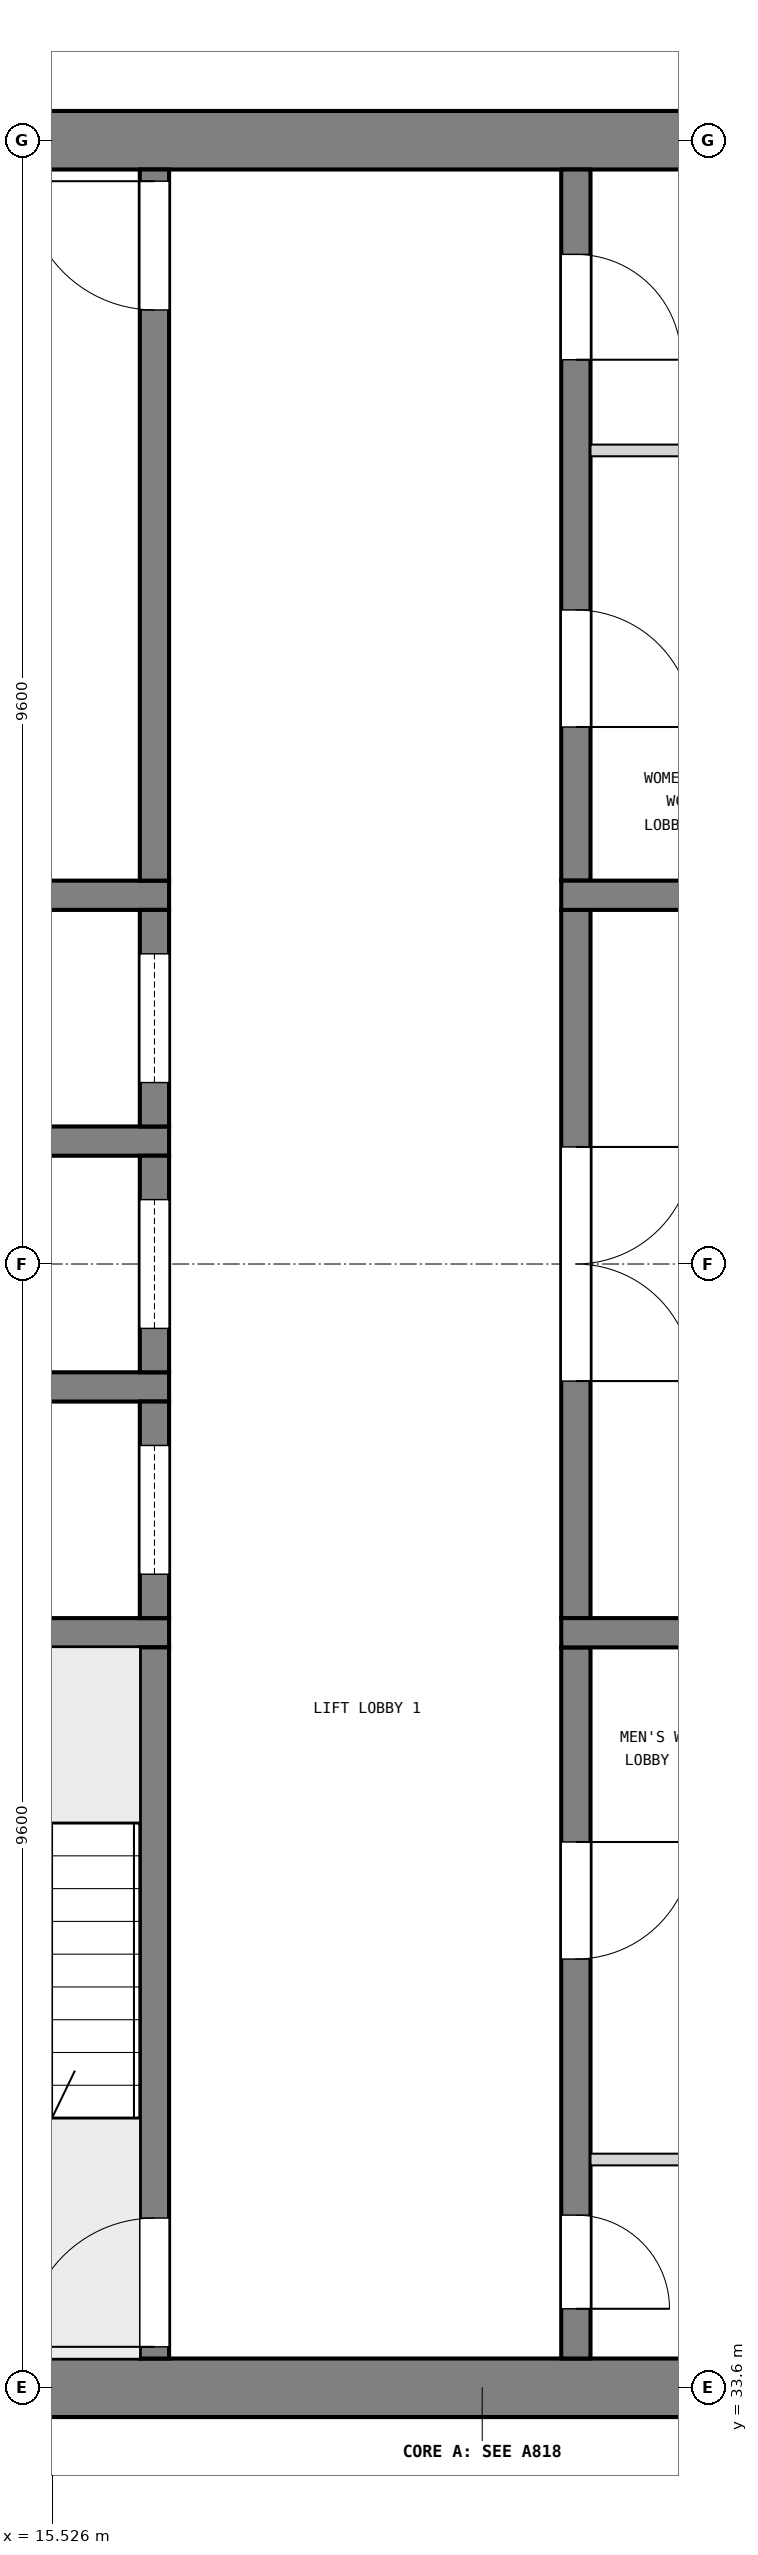
"""IFC4 building model, lengths in metres.
Left out: names, types, materials, properties, quantities, classifications, styles, units other than length and angle.
Written with IfcOpenShell. Run it as: python <this file> out.ifc"""

import sys

from ifc_helpers import new_model, si_unit, direction, frame, frame_2d, origin, place, context, subcontext, project, spatial, rectangle, extrude, element, fill, save


model = new_model("IFC4")
c1 = context("Model", 3, precision=1e-05, world=origin(), true_north=direction((0.0, 1.0)))
c2 = subcontext(c1, "Body", "Model", "MODEL_VIEW")
j1 = project(units=[si_unit("LENGTHUNIT", "METRE"), si_unit("PLANEANGLEUNIT", "RADIAN")], contexts=[c1])
p1 = place(None, origin())
s1 = spatial("IfcSite", under=j1, at=p1, CompositionType="ELEMENT")
p2 = place(p1, origin())
s2 = spatial("IfcBuilding", under=s1, at=p2, CompositionType="ELEMENT")
p3 = place(p2, frame((0.0, 0.0, 64.2)))
s3 = spatial("IfcBuildingStorey", under=s2, at=p3, CompositionType="ELEMENT", Elevation=64.2)
p4 = place(p3, frame((12.55, 52.8, 0.0), z_axis=(0.0, 0.0, 1.0), x_axis=(1.0, 0.0, 0.0)))
e1 = element("IfcWall", 1, at=p4, inside=s3, PredefinedType="SHEAR", context=c2, shape_type="SweptSolid", body=[
    extrude(rectangle(XDim=13.3, YDim=0.5, at=frame_2d((6.65, 0.0))), origin(), (0.0, 0.0, 1.0), 5.1),
])
p5 = place(p4, frame((1.85, 0.0, 1.0)))
e2 = element("IfcOpeningElement", 2, at=p5, cuts=e1, PredefinedType="OPENING", context=c2, shape_type="SweptSolid", body=[
    extrude(rectangle(XDim=0.4, YDim=2.0, at=frame_2d((0.2, 1.0))), frame((0.0, 0.26, 0.0), z_axis=(0.0, -1.0, 0.0), x_axis=(1.0, 0.0, 0.0)), (0.0, 0.0, 1.0), 0.52),
])
p6 = place(p3, frame((12.55, 33.6, 0.0), z_axis=(0.0, 0.0, 1.0), x_axis=(1.0, 0.0, 0.0)))
e3 = element("IfcWall", 3, at=p6, inside=s3, PredefinedType="SHEAR", context=c2, shape_type="SweptSolid", body=[
    extrude(rectangle(XDim=13.3, YDim=0.5, at=frame_2d((6.65, 0.0))), origin(), (0.0, 0.0, 1.0), 5.1),
])
p7 = place(p6, frame((1.85, 0.0, 1.0)))
e4 = element("IfcOpeningElement", 4, at=p7, cuts=e3, PredefinedType="OPENING", context=c2, shape_type="SweptSolid", body=[
    extrude(rectangle(XDim=0.4, YDim=2.0, at=frame_2d((0.2, 1.0))), frame((0.0, 0.26, 0.0), z_axis=(0.0, -1.0, 0.0), x_axis=(1.0, 0.0, 0.0)), (0.0, 0.0, 1.0), 0.52),
])
for number, where, z_axis, x_axis in (
    (5, (13.05, 40.05, 0.0), (0.0, 0.0, 1.0), (1.0, 0.0, 0.0)),
    (6, (13.05, 42.15, 0.0), (0.0, 0.0, 1.0), (1.0, 0.0, 0.0)),
    (7, (13.05, 44.25, 0.0), (0.0, 0.0, 1.0), (1.0, 0.0, 0.0)),
    (8, (13.05, 46.35, 0.0), (0.0, 0.0, 1.0), (1.0, 0.0, 0.0)),
):
    element("IfcWall", number, at=place(p3, frame(where, z_axis=z_axis, x_axis=x_axis)), inside=s3, PredefinedType="SOLIDWALL", context=c2, shape_type="SweptSolid", body=[
        extrude(rectangle(XDim=3.475, YDim=0.25, at=frame_2d((1.737, 0.0))), origin(), (0.0, 0.0, 1.0), 5.1),
    ])
p8 = place(p3, frame((16.4, 33.85, 0.0), z_axis=(0.0, 0.0, 1.0), x_axis=(0.0, 1.0, 0.0)))
e9 = element("IfcWall", 9, at=p8, inside=s3, PredefinedType="SOLIDWALL", context=c2, shape_type="SweptSolid", body=[
    extrude(rectangle(XDim=6.075, YDim=0.25, at=frame_2d((3.038, 0.0))), origin(), (0.0, 0.0, 1.0), 5.1),
])
p9 = place(p8, frame((0.1, 0.0, 0.0)))
e10 = element("IfcOpeningElement", 10, at=p9, cuts=e9, PredefinedType="OPENING", context=c2, shape_type="SweptSolid", body=[
    extrude(rectangle(XDim=1.1, YDim=2.1, at=frame_2d((0.55, 1.05))), frame((0.0, 0.135, 0.0), z_axis=(0.0, -1.0, 0.0), x_axis=(1.0, 0.0, 0.0)), (0.0, 0.0, 1.0), 0.27),
])
p10 = place(p3, frame((16.4, 40.175, 0.0), z_axis=(0.0, 0.0, 1.0), x_axis=(0.0, 1.0, 0.0)))
e11 = element("IfcWall", 11, at=p10, inside=s3, PredefinedType="SOLIDWALL", context=c2, shape_type="SweptSolid", body=[
    extrude(rectangle(XDim=1.85, YDim=0.25, at=frame_2d((0.925, 0.0))), origin(), (0.0, 0.0, 1.0), 5.1),
])
p11 = place(p10, frame((0.375, 0.0, 0.0)))
e12 = element("IfcOpeningElement", 12, at=p11, cuts=e11, PredefinedType="OPENING", context=c2, shape_type="SweptSolid", body=[
    extrude(rectangle(XDim=1.1, YDim=2.1, at=frame_2d((0.55, 1.05))), frame((0.0, 0.135, 0.0), z_axis=(0.0, -1.0, 0.0), x_axis=(1.0, 0.0, 0.0)), (0.0, 0.0, 1.0), 0.27),
])
p12 = place(p3, frame((16.4, 42.275, 0.0), z_axis=(0.0, 0.0, 1.0), x_axis=(0.0, 1.0, 0.0)))
e13 = element("IfcWall", 13, at=p12, inside=s3, PredefinedType="SOLIDWALL", context=c2, shape_type="SweptSolid", body=[
    extrude(rectangle(XDim=1.85, YDim=0.25, at=frame_2d((0.925, 0.0))), origin(), (0.0, 0.0, 1.0), 5.1),
])
p13 = place(p12, frame((0.375, 0.0, 0.0)))
e14 = element("IfcOpeningElement", 14, at=p13, cuts=e13, PredefinedType="OPENING", context=c2, shape_type="SweptSolid", body=[
    extrude(rectangle(XDim=1.1, YDim=2.1, at=frame_2d((0.55, 1.05))), frame((0.0, 0.135, 0.0), z_axis=(0.0, -1.0, 0.0), x_axis=(1.0, 0.0, 0.0)), (0.0, 0.0, 1.0), 0.27),
])
p14 = place(p3, frame((16.4, 44.375, 0.0), z_axis=(0.0, 0.0, 1.0), x_axis=(0.0, 1.0, 0.0)))
e15 = element("IfcWall", 15, at=p14, inside=s3, PredefinedType="SOLIDWALL", context=c2, shape_type="SweptSolid", body=[
    extrude(rectangle(XDim=1.85, YDim=0.25, at=frame_2d((0.925, 0.0))), origin(), (0.0, 0.0, 1.0), 5.1),
])
p15 = place(p14, frame((0.375, 0.0, 0.0)))
e16 = element("IfcOpeningElement", 16, at=p15, cuts=e15, PredefinedType="OPENING", context=c2, shape_type="SweptSolid", body=[
    extrude(rectangle(XDim=1.1, YDim=2.1, at=frame_2d((0.55, 1.05))), frame((0.0, 0.135, 0.0), z_axis=(0.0, -1.0, 0.0), x_axis=(1.0, 0.0, 0.0)), (0.0, 0.0, 1.0), 0.27),
])
p16 = place(p3, frame((16.4, 46.475, 0.0), z_axis=(0.0, 0.0, 1.0), x_axis=(0.0, 1.0, 0.0)))
e17 = element("IfcWall", 17, at=p16, inside=s3, PredefinedType="SOLIDWALL", context=c2, shape_type="SweptSolid", body=[
    extrude(rectangle(XDim=6.075, YDim=0.25, at=frame_2d((3.038, 0.0))), origin(), (0.0, 0.0, 1.0), 5.1),
])
p17 = place(p16, frame((4.875, 0.0, 0.0)))
e18 = element("IfcOpeningElement", 18, at=p17, cuts=e17, PredefinedType="OPENING", context=c2, shape_type="SweptSolid", body=[
    extrude(rectangle(XDim=1.1, YDim=2.1, at=frame_2d((0.55, 1.05))), frame((0.0, 0.135, 0.0), z_axis=(0.0, -1.0, 0.0), x_axis=(1.0, 0.0, 0.0)), (0.0, 0.0, 1.0), 0.27),
])
p18 = place(p3, frame((20.0, 33.85, 0.0), z_axis=(0.0, 0.0, 1.0), x_axis=(0.0, 1.0, 0.0)))
e19 = element("IfcWall", 19, at=p18, inside=s3, PredefinedType="SOLIDWALL", context=c2, shape_type="SweptSolid", body=[
    extrude(rectangle(XDim=6.075, YDim=0.25, at=frame_2d((3.038, 0.0))), origin(), (0.0, 0.0, 1.0), 5.1),
])
p19 = place(p18, frame((0.425, 0.0, 0.0)))
e20 = element("IfcOpeningElement", 20, at=p19, cuts=e19, PredefinedType="OPENING", context=c2, shape_type="SweptSolid", body=[
    extrude(rectangle(XDim=0.8, YDim=2.1, at=frame_2d((0.4, 1.05))), frame((0.0, 0.135, 0.0), z_axis=(0.0, -1.0, 0.0), x_axis=(1.0, 0.0, 0.0)), (0.0, 0.0, 1.0), 0.27),
])
p20 = place(p18, frame((3.413, 0.0, 0.0)))
e21 = element("IfcOpeningElement", 21, at=p20, cuts=e19, PredefinedType="OPENING", context=c2, shape_type="SweptSolid", body=[
    extrude(rectangle(XDim=1.0, YDim=2.1, at=frame_2d((0.5, 1.05))), frame((0.0, 0.135, 0.0), z_axis=(0.0, -1.0, 0.0), x_axis=(1.0, 0.0, 0.0)), (0.0, 0.0, 1.0), 0.27),
])
p21 = place(p3, frame((20.0, 40.175, 0.0), z_axis=(0.0, 0.0, 1.0), x_axis=(0.0, 1.0, 0.0)))
e22 = element("IfcWall", 22, at=p21, inside=s3, PredefinedType="SOLIDWALL", context=c2, shape_type="SweptSolid", body=[
    extrude(rectangle(XDim=6.05, YDim=0.25, at=frame_2d((3.025, 0.0))), origin(), (0.0, 0.0, 1.0), 5.1),
])
p22 = place(p21, frame((2.025, 0.0, 0.0)))
e23 = element("IfcOpeningElement", 23, at=p22, cuts=e22, PredefinedType="OPENING", context=c2, shape_type="SweptSolid", body=[
    extrude(rectangle(XDim=2.0, YDim=2.1, at=frame_2d((1.0, 1.05))), frame((0.0, 0.135, 0.0), z_axis=(0.0, -1.0, 0.0), x_axis=(1.0, 0.0, 0.0)), (0.0, 0.0, 1.0), 0.27),
])
p23 = place(p3, frame((20.0, 46.475, 0.0), z_axis=(0.0, 0.0, 1.0), x_axis=(0.0, 1.0, 0.0)))
e24 = element("IfcWall", 24, at=p23, inside=s3, PredefinedType="SOLIDWALL", context=c2, shape_type="SweptSolid", body=[
    extrude(rectangle(XDim=6.075, YDim=0.25, at=frame_2d((3.038, 0.0))), origin(), (0.0, 0.0, 1.0), 5.1),
])
p24 = place(p23, frame((1.312, 0.0, 0.0)))
e25 = element("IfcOpeningElement", 25, at=p24, cuts=e24, PredefinedType="OPENING", context=c2, shape_type="SweptSolid", body=[
    extrude(rectangle(XDim=1.0, YDim=2.1, at=frame_2d((0.5, 1.05))), frame((0.0, 0.135, 0.0), z_axis=(0.0, -1.0, 0.0), x_axis=(1.0, 0.0, 0.0)), (0.0, 0.0, 1.0), 0.27),
])
p25 = place(p23, frame((4.45, 0.0, 0.0)))
e26 = element("IfcOpeningElement", 26, at=p25, cuts=e24, PredefinedType="OPENING", context=c2, shape_type="SweptSolid", body=[
    extrude(rectangle(XDim=0.9, YDim=2.1, at=frame_2d((0.45, 1.05))), frame((0.0, 0.135, 0.0), z_axis=(0.0, -1.0, 0.0), x_axis=(1.0, 0.0, 0.0)), (0.0, 0.0, 1.0), 0.27),
])
for number, where, z_axis, x_axis in (
    (27, (19.875, 40.05, 0.0), (0.0, 0.0, 1.0), (1.0, 0.0, 0.0)),
    (28, (19.875, 46.35, 0.0), (0.0, 0.0, 1.0), (1.0, 0.0, 0.0)),
):
    element("IfcWall", number, at=place(p3, frame(where, z_axis=z_axis, x_axis=x_axis)), inside=s3, PredefinedType="SOLIDWALL", context=c2, shape_type="SweptSolid", body=[
        extrude(rectangle(XDim=5.475, YDim=0.25, at=frame_2d((2.738, 0.0))), origin(), (0.0, 0.0, 1.0), 5.1),
    ])
for number, where, z_axis, x_axis in (
    (29, (20.125, 35.55, 0.0), (0.0, 0.0, 1.0), (1.0, 0.0, 0.0)),
    (30, (20.125, 50.15, 0.0), (0.0, 0.0, 1.0), (1.0, 0.0, 0.0)),
):
    element("IfcWall", number, at=place(p3, frame(where, z_axis=z_axis, x_axis=x_axis)), inside=s3, PredefinedType="PARTITIONING", context=c2, shape_type="SweptSolid", body=[
        extrude(rectangle(XDim=5.225, YDim=0.1, at=frame_2d((2.613, 0.0))), origin(), (0.0, 0.0, 1.0), 5.1),
    ])
p26 = place(p2, frame((0.0, 0.0, 69.3)))
p27 = place(p26, frame((16.4, 33.85, 0.3), z_axis=(0.0, 0.0, 1.0), x_axis=(0.0, 1.0, 0.0)))
p28 = place(p27, frame((4.712, 0.0, 0.13)))
p29 = place(p28, frame((1.1, 0.0, 0.0), z_axis=(0.0, 0.0, 1.0), x_axis=(-1.0, 0.0, 0.0)))
e31 = element("IfcDoor", 31, at=p29, inside=s3, OperationType="SINGLE_SWING_RIGHT", PredefinedType="DOOR", context=c2, shape_type="SweptSolid", body=[
    extrude(rectangle(XDim=1.1, YDim=2.1, at=frame_2d((0.55, 1.05))), frame((0.0, 0.025, 0.0), z_axis=(0.0, -1.0, 0.0), x_axis=(1.0, 0.0, 0.0)), (0.0, 0.0, 1.0), 0.05),
])
p30 = place(p9, origin())
e32 = element("IfcDoor", 32, at=p30, inside=s3, OperationType="SINGLE_SWING_LEFT", PredefinedType="DOOR", context=c2, shape_type="SweptSolid", body=[
    extrude(rectangle(XDim=1.1, YDim=2.1, at=frame_2d((0.55, 1.05))), frame((0.0, 0.025, 0.0), z_axis=(0.0, -1.0, 0.0), x_axis=(1.0, 0.0, 0.0)), (0.0, 0.0, 1.0), 0.05),
])
fill(e10, e32)
p31 = place(p17, origin())
e33 = element("IfcDoor", 33, at=p31, inside=s3, OperationType="SINGLE_SWING_RIGHT", PredefinedType="DOOR", context=c2, shape_type="SweptSolid", body=[
    extrude(rectangle(XDim=1.1, YDim=2.1, at=frame_2d((0.55, 1.05))), frame((0.0, 0.025, 0.0), z_axis=(0.0, -1.0, 0.0), x_axis=(1.0, 0.0, 0.0)), (0.0, 0.0, 1.0), 0.05),
])
fill(e18, e33)
p32 = place(p11, origin())
e34 = element("IfcDoor", 34, at=p32, inside=s3, OperationType="SLIDING_TO_LEFT", PredefinedType="DOOR", context=c2, shape_type="SweptSolid", body=[
    extrude(rectangle(XDim=1.1, YDim=2.1, at=frame_2d((0.55, 1.05))), frame((0.0, 0.025, 0.0), z_axis=(0.0, -1.0, 0.0), x_axis=(1.0, 0.0, 0.0)), (0.0, 0.0, 1.0), 0.05),
])
fill(e12, e34)
p33 = place(p13, origin())
e35 = element("IfcDoor", 35, at=p33, inside=s3, OperationType="SLIDING_TO_LEFT", PredefinedType="DOOR", context=c2, shape_type="SweptSolid", body=[
    extrude(rectangle(XDim=1.1, YDim=2.1, at=frame_2d((0.55, 1.05))), frame((0.0, 0.025, 0.0), z_axis=(0.0, -1.0, 0.0), x_axis=(1.0, 0.0, 0.0)), (0.0, 0.0, 1.0), 0.05),
])
fill(e14, e35)
p34 = place(p15, origin())
e36 = element("IfcDoor", 36, at=p34, inside=s3, OperationType="SLIDING_TO_LEFT", PredefinedType="DOOR", context=c2, shape_type="SweptSolid", body=[
    extrude(rectangle(XDim=1.1, YDim=2.1, at=frame_2d((0.55, 1.05))), frame((0.0, 0.025, 0.0), z_axis=(0.0, -1.0, 0.0), x_axis=(1.0, 0.0, 0.0)), (0.0, 0.0, 1.0), 0.05),
])
fill(e16, e36)
p35 = place(p22, frame((2.0, 0.0, 0.0), z_axis=(0.0, 0.0, 1.0), x_axis=(-1.0, 0.0, 0.0)))
e37 = element("IfcDoor", 37, at=p35, inside=s3, OperationType="DOUBLE_DOOR_SINGLE_SWING", PredefinedType="DOOR", context=c2, shape_type="SweptSolid", body=[
    extrude(rectangle(XDim=2.0, YDim=2.1, at=frame_2d((1.0, 1.05))), frame((0.0, 0.025, 0.0), z_axis=(0.0, -1.0, 0.0), x_axis=(1.0, 0.0, 0.0)), (0.0, 0.0, 1.0), 0.05),
])
fill(e23, e37)
p36 = place(p19, frame((0.8, 0.0, 0.0), z_axis=(0.0, 0.0, 1.0), x_axis=(-1.0, 0.0, 0.0)))
e38 = element("IfcDoor", 38, at=p36, inside=s3, OperationType="SINGLE_SWING_RIGHT", PredefinedType="DOOR", context=c2, shape_type="SweptSolid", body=[
    extrude(rectangle(XDim=0.8, YDim=2.1, at=frame_2d((0.4, 1.05))), frame((0.0, 0.025, 0.0), z_axis=(0.0, -1.0, 0.0), x_axis=(1.0, 0.0, 0.0)), (0.0, 0.0, 1.0), 0.05),
])
fill(e20, e38)
p37 = place(p20, frame((1.0, 0.0, 0.0), z_axis=(0.0, 0.0, 1.0), x_axis=(-1.0, 0.0, 0.0)))
e39 = element("IfcDoor", 39, at=p37, inside=s3, OperationType="SINGLE_SWING_LEFT", PredefinedType="DOOR", context=c2, shape_type="SweptSolid", body=[
    extrude(rectangle(XDim=1.0, YDim=2.1, at=frame_2d((0.5, 1.05))), frame((0.0, 0.025, 0.0), z_axis=(0.0, -1.0, 0.0), x_axis=(1.0, 0.0, 0.0)), (0.0, 0.0, 1.0), 0.05),
])
fill(e21, e39)
p38 = place(p24, frame((1.0, 0.0, 0.0), z_axis=(0.0, 0.0, 1.0), x_axis=(-1.0, 0.0, 0.0)))
e40 = element("IfcDoor", 40, at=p38, inside=s3, OperationType="SINGLE_SWING_RIGHT", PredefinedType="DOOR", context=c2, shape_type="SweptSolid", body=[
    extrude(rectangle(XDim=1.0, YDim=2.1, at=frame_2d((0.5, 1.05))), frame((0.0, 0.025, 0.0), z_axis=(0.0, -1.0, 0.0), x_axis=(1.0, 0.0, 0.0)), (0.0, 0.0, 1.0), 0.05),
])
fill(e25, e40)
p39 = place(p25, frame((0.9, 0.0, 0.0), z_axis=(0.0, 0.0, 1.0), x_axis=(-1.0, 0.0, 0.0)))
e41 = element("IfcDoor", 41, at=p39, inside=s3, OperationType="SINGLE_SWING_RIGHT", PredefinedType="DOOR", context=c2, shape_type="SweptSolid", body=[
    extrude(rectangle(XDim=0.9, YDim=2.1, at=frame_2d((0.45, 1.05))), frame((0.0, 0.025, 0.0), z_axis=(0.0, -1.0, 0.0), x_axis=(1.0, 0.0, 0.0)), (0.0, 0.0, 1.0), 0.05),
])
fill(e26, e41)
save(model, sys.argv[1])
